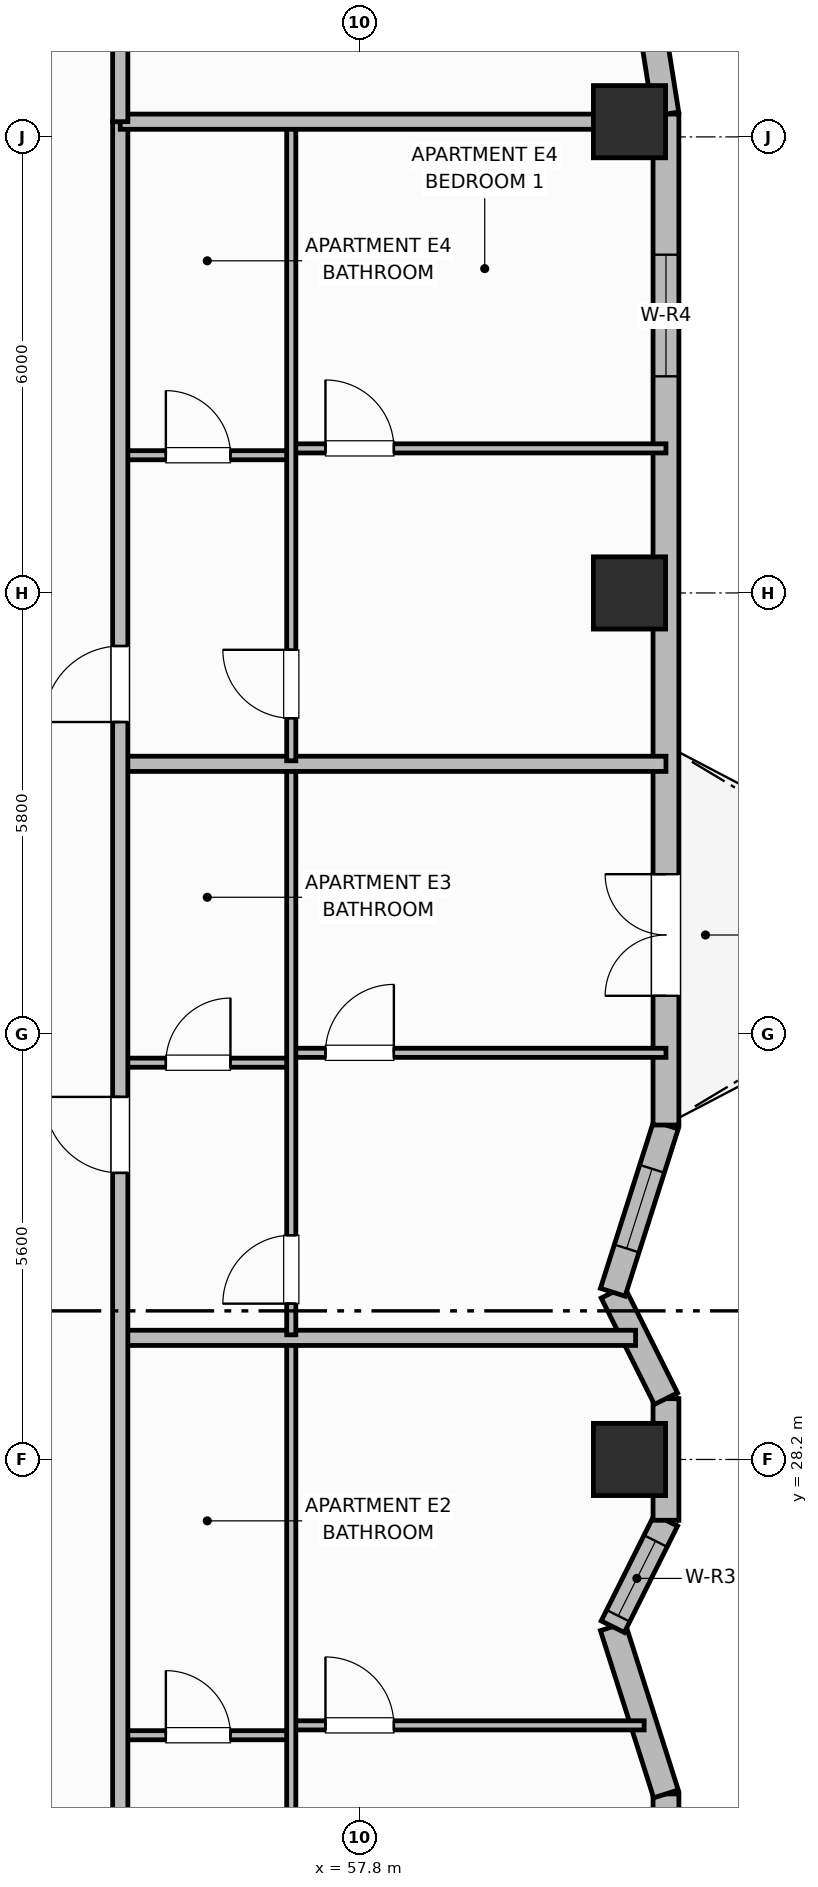
"""IFC4 building model, lengths in metres.
Left out: names, types, materials, properties, quantities, classifications, styles, units other than length and angle.
Written with IfcOpenShell. Run it as: python <this file> out.ifc"""

import sys

from ifc_helpers import new_model, si_unit, direction, frame, frame_2d, origin, origin_2d, place, context, subcontext, project, spatial, rectangle, extrude, element, fill, save


model = new_model("IFC4")
c1 = context("Model", 3, precision=1e-05, world=origin(), true_north=direction((0.0, 1.0)))
c2 = subcontext(c1, "Body", "Model", "MODEL_VIEW")
j1 = project(units=[si_unit("LENGTHUNIT", "METRE"), si_unit("PLANEANGLEUNIT", "RADIAN")], contexts=[c1])
p1 = place(None, origin())
s1 = spatial("IfcSite", under=j1, at=p1, CompositionType="ELEMENT")
p2 = place(p1, origin())
s2 = spatial("IfcBuilding", under=s1, at=p2, CompositionType="ELEMENT")
p3 = place(p2, frame((0.0, 0.0, 177.4)))
s3 = spatial("IfcBuildingStorey", under=s2, at=p3, CompositionType="ELEMENT", Elevation=177.4)
for number, where, z_axis, x_axis in (
    (1, (61.35, 28.2, 0.0), (0.0, 0.0, 1.0), (1.0, 0.0, 0.0)),
    (2, (61.35, 39.6, 0.0), (0.0, 0.0, 1.0), (1.0, 0.0, 0.0)),
    (3, (61.35, 45.8, 0.0), (0.0, 0.0, 1.0), (1.0, 0.0, 0.0)),
):
    element("IfcColumn", number, at=place(p3, frame(where, z_axis=z_axis, x_axis=x_axis)), inside=s3, PredefinedType="COLUMN", context=c2, shape_type="SweptSolid", body=[
        extrude(rectangle(XDim=0.95, YDim=0.95, at=origin_2d()), origin(), (0.0, 0.0, 1.0), 3.7),
    ])
p4 = place(p3, frame((61.83, 10.5, 0.0), z_axis=(0.0, 0.0, 1.0), x_axis=(0.0, 1.0, 0.0)))
e4 = element("IfcWall", 4, at=p4, inside=s3, PredefinedType="SOLIDWALL", context=c2, shape_type="SweptSolid", body=[
    extrude(rectangle(XDim=13.3, YDim=0.34, at=frame_2d((6.65, 0.0))), origin(), (0.0, 0.0, 1.0), 2.72),
])
p5 = place(p4, frame((1.75, 0.0, 0.75)))
e5 = element("IfcOpeningElement", 5, at=p5, cuts=e4, PredefinedType="OPENING", context=c2, shape_type="SweptSolid", body=[
    extrude(rectangle(XDim=1.8, YDim=1.85, at=frame_2d((0.9, 0.925))), frame((0.0, 0.18, 0.0), z_axis=(0.0, -1.0, 0.0), x_axis=(1.0, 0.0, 0.0)), (0.0, 0.0, 1.0), 0.36),
])
p6 = place(p4, frame((6.84, 0.0, 0.71)))
e6 = element("IfcOpeningElement", 6, at=p6, cuts=e4, PredefinedType="OPENING", context=c2, shape_type="SweptSolid", body=[
    extrude(rectangle(XDim=1.4, YDim=1.85, at=frame_2d((0.7, 0.925))), frame((0.0, 0.18, 0.0), z_axis=(0.0, -1.0, 0.0), x_axis=(1.0, 0.0, 0.0)), (0.0, 0.0, 1.0), 0.36),
])
p7 = place(p4, frame((9.75, 0.0, 0.75)))
e7 = element("IfcOpeningElement", 7, at=p7, cuts=e4, PredefinedType="OPENING", context=c2, shape_type="SweptSolid", body=[
    extrude(rectangle(XDim=1.8, YDim=1.85, at=frame_2d((0.9, 0.925))), frame((0.0, 0.18, 0.0), z_axis=(0.0, -1.0, 0.0), x_axis=(1.0, 0.0, 0.0)), (0.0, 0.0, 1.0), 0.36),
])
p8 = place(p3, frame((61.83, 23.8, 0.0), z_axis=(0.0, 0.0, 1.0), x_axis=(-0.303286588318, 0.95289938889, 0.0)))
e8 = element("IfcWall", 8, at=p8, inside=s3, PredefinedType="SOLIDWALL", context=c2, shape_type="SweptSolid", body=[
    extrude(rectangle(XDim=2.309, YDim=0.34, at=frame_2d((1.154, 0.0))), origin(), (0.0, 0.0, 1.0), 2.72),
])
p9 = place(p3, frame((61.13, 26.0, 0.0), z_axis=(0.0, 0.0, 1.0), x_axis=(0.447338371726, 0.894364792007, 0.0)))
e9 = element("IfcWall", 9, at=p9, inside=s3, PredefinedType="SOLIDWALL", context=c2, shape_type="SweptSolid", body=[
    extrude(rectangle(XDim=1.565, YDim=0.34, at=frame_2d((0.783, 0.0))), origin(), (0.0, 0.0, 1.0), 2.72),
])
p10 = place(p9, frame((0.16, 0.0, 0.91)))
e10 = element("IfcOpeningElement", 10, at=p10, cuts=e9, PredefinedType="OPENING", context=c2, shape_type="SweptSolid", body=[
    extrude(rectangle(XDim=1.1, YDim=1.65, at=frame_2d((0.55, 0.825))), frame((0.0, 0.18, 0.0), z_axis=(0.0, -1.0, 0.0), x_axis=(1.0, 0.0, 0.0)), (0.0, 0.0, 1.0), 0.36),
])
p11 = place(p3, frame((61.83, 27.4, 0.0), z_axis=(0.0, 0.0, 1.0), x_axis=(0.0, 1.0, 0.0)))
e11 = element("IfcWall", 11, at=p11, inside=s3, PredefinedType="SOLIDWALL", context=c2, shape_type="SweptSolid", body=[
    extrude(rectangle(XDim=1.6, YDim=0.34, at=frame_2d((0.8, 0.0))), origin(), (0.0, 0.0, 1.0), 2.72),
])
p12 = place(p3, frame((61.83, 29.0, 0.0), z_axis=(0.0, 0.0, 1.0), x_axis=(-0.447338371726, 0.894364792007, 0.0)))
e12 = element("IfcWall", 12, at=p12, inside=s3, PredefinedType="SOLIDWALL", context=c2, shape_type="SweptSolid", body=[
    extrude(rectangle(XDim=1.565, YDim=0.34, at=frame_2d((0.783, 0.0))), origin(), (0.0, 0.0, 1.0), 2.72),
])
p13 = place(p3, frame((61.13, 30.4, 0.0), z_axis=(0.0, 0.0, 1.0), x_axis=(0.303256029766, 0.952909114454, 0.0)))
e13 = element("IfcWall", 13, at=p13, inside=s3, PredefinedType="SOLIDWALL", context=c2, shape_type="SweptSolid", body=[
    extrude(rectangle(XDim=2.309, YDim=0.34, at=frame_2d((1.154, 0.0))), origin(), (0.0, 0.0, 1.0), 2.72),
])
p14 = place(p13, frame((0.604, 0.0, 0.91)))
e14 = element("IfcOpeningElement", 14, at=p14, cuts=e13, PredefinedType="OPENING", context=c2, shape_type="SweptSolid", body=[
    extrude(rectangle(XDim=1.1, YDim=1.65, at=frame_2d((0.55, 0.825))), frame((0.0, 0.18, 0.0), z_axis=(0.0, -1.0, 0.0), x_axis=(1.0, 0.0, 0.0)), (0.0, 0.0, 1.0), 0.36),
])
p15 = place(p3, frame((61.83, 32.6, 0.0), z_axis=(0.0, 0.0, 1.0), x_axis=(0.0, 1.0, 0.0)))
e15 = element("IfcWall", 15, at=p15, inside=s3, PredefinedType="SOLIDWALL", context=c2, shape_type="SweptSolid", body=[
    extrude(rectangle(XDim=13.3, YDim=0.34, at=frame_2d((6.65, 0.0))), origin(), (0.0, 0.0, 1.0), 2.72),
])
p16 = place(p15, frame((1.7, 0.0, 0.0)))
e16 = element("IfcOpeningElement", 16, at=p16, cuts=e15, PredefinedType="OPENING", context=c2, shape_type="SweptSolid", body=[
    extrude(rectangle(XDim=1.6, YDim=2.1, at=frame_2d((0.8, 1.05))), frame((0.0, 0.18, 0.0), z_axis=(0.0, -1.0, 0.0), x_axis=(1.0, 0.0, 0.0)), (0.0, 0.0, 1.0), 0.36),
])
p17 = place(p15, frame((9.85, 0.0, 0.7)))
e17 = element("IfcOpeningElement", 17, at=p17, cuts=e15, PredefinedType="OPENING", context=c2, shape_type="SweptSolid", body=[
    extrude(rectangle(XDim=1.6, YDim=1.9, at=frame_2d((0.8, 0.95))), frame((0.0, 0.18, 0.0), z_axis=(0.0, -1.0, 0.0), x_axis=(1.0, 0.0, 0.0)), (0.0, 0.0, 1.0), 0.36),
])
p18 = place(p3, frame((61.83, 45.9, 0.0), z_axis=(0.0, 0.0, 1.0), x_axis=(-0.156481329164, 0.987680916907, 0.0)))
e18 = element("IfcWall", 18, at=p18, inside=s3, PredefinedType="SOLIDWALL", context=c2, shape_type="SweptSolid", body=[
    extrude(rectangle(XDim=1.136, YDim=0.34, at=frame_2d((0.568, 0.0))), origin(), (0.0, 0.0, 1.0), 2.72),
])
p19 = place(p3, frame((54.65, 24.572, 0.0), z_axis=(0.0, 0.0, 1.0), x_axis=(1.0, 0.0, 0.0)))
e19 = element("IfcWall", 19, at=p19, inside=s3, PredefinedType="PARTITIONING", context=c2, shape_type="SweptSolid", body=[
    extrude(rectangle(XDim=2.25, YDim=0.12, at=frame_2d((1.125, 0.0))), origin(), (0.0, 0.0, 1.0), 2.55),
])
p20 = place(p19, frame((0.6, 0.0, 0.0)))
e20 = element("IfcOpeningElement", 20, at=p20, cuts=e19, PredefinedType="OPENING", context=c2, shape_type="SweptSolid", body=[
    extrude(rectangle(XDim=0.85, YDim=2.1, at=frame_2d((0.425, 1.05))), frame((0.0, 0.07, 0.0), z_axis=(0.0, -1.0, 0.0), x_axis=(1.0, 0.0, 0.0)), (0.0, 0.0, 1.0), 0.14),
])
p21 = place(p3, frame((56.9, 24.702, 0.0), z_axis=(0.0, 0.0, 1.0), x_axis=(1.0, 0.0, 0.0)))
e21 = element("IfcWall", 21, at=p21, inside=s3, PredefinedType="PARTITIONING", context=c2, shape_type="SweptSolid", body=[
    extrude(rectangle(XDim=4.643, YDim=0.12, at=frame_2d((2.322, 0.0))), origin(), (0.0, 0.0, 1.0), 2.55),
])
p22 = place(p21, frame((0.45, 0.0, 0.0)))
e22 = element("IfcOpeningElement", 22, at=p22, cuts=e21, PredefinedType="OPENING", context=c2, shape_type="SweptSolid", body=[
    extrude(rectangle(XDim=0.9, YDim=2.1, at=frame_2d((0.45, 1.05))), frame((0.0, 0.07, 0.0), z_axis=(0.0, -1.0, 0.0), x_axis=(1.0, 0.0, 0.0)), (0.0, 0.0, 1.0), 0.14),
])
p23 = place(p3, frame((56.9, 19.792, 0.0), z_axis=(0.0, 0.0, 1.0), x_axis=(0.0, 1.0, 0.0)))
e23 = element("IfcWall", 23, at=p23, inside=s3, PredefinedType="PARTITIONING", context=c2, shape_type="SweptSolid", body=[
    extrude(rectangle(XDim=9.968, YDim=0.12, at=frame_2d((4.984, 0.0))), origin(), (0.0, 0.0, 1.0), 2.55),
])
p24 = place(p23, frame((0.41, 0.0, 0.0)))
e24 = element("IfcOpeningElement", 24, at=p24, cuts=e23, PredefinedType="OPENING", context=c2, shape_type="SweptSolid", body=[
    extrude(rectangle(XDim=0.9, YDim=2.1, at=frame_2d((0.45, 1.05))), frame((0.0, 0.07, 0.0), z_axis=(0.0, -1.0, 0.0), x_axis=(1.0, 0.0, 0.0)), (0.0, 0.0, 1.0), 0.14),
])
p25 = place(p3, frame((54.65, 29.8, 0.0), z_axis=(0.0, 0.0, 1.0), x_axis=(1.0, 0.0, 0.0)))
e25 = element("IfcWall", 25, at=p25, inside=s3, PredefinedType="PARTITIONING", context=c2, shape_type="SweptSolid", body=[
    extrude(rectangle(XDim=6.78, YDim=0.2, at=frame_2d((3.39, 0.0))), origin(), (0.0, 0.0, 1.0), 2.55),
])
p26 = place(p3, frame((54.65, 33.42, 0.0), z_axis=(0.0, 0.0, 1.0), x_axis=(1.0, 0.0, 0.0)))
e26 = element("IfcWall", 26, at=p26, inside=s3, PredefinedType="PARTITIONING", context=c2, shape_type="SweptSolid", body=[
    extrude(rectangle(XDim=2.25, YDim=0.12, at=frame_2d((1.125, 0.0))), origin(), (0.0, 0.0, 1.0), 2.55),
])
p27 = place(p26, frame((0.6, 0.0, 0.0)))
e27 = element("IfcOpeningElement", 27, at=p27, cuts=e26, PredefinedType="OPENING", context=c2, shape_type="SweptSolid", body=[
    extrude(rectangle(XDim=0.85, YDim=2.1, at=frame_2d((0.425, 1.05))), frame((0.0, 0.07, 0.0), z_axis=(0.0, -1.0, 0.0), x_axis=(1.0, 0.0, 0.0)), (0.0, 0.0, 1.0), 0.14),
])
p28 = place(p3, frame((56.9, 33.55, 0.0), z_axis=(0.0, 0.0, 1.0), x_axis=(1.0, 0.0, 0.0)))
e28 = element("IfcWall", 28, at=p28, inside=s3, PredefinedType="PARTITIONING", context=c2, shape_type="SweptSolid", body=[
    extrude(rectangle(XDim=4.93, YDim=0.12, at=frame_2d((2.465, 0.0))), origin(), (0.0, 0.0, 1.0), 2.55),
])
p29 = place(p28, frame((0.45, 0.0, 0.0)))
e29 = element("IfcOpeningElement", 29, at=p29, cuts=e28, PredefinedType="OPENING", context=c2, shape_type="SweptSolid", body=[
    extrude(rectangle(XDim=0.9, YDim=2.1, at=frame_2d((0.45, 1.05))), frame((0.0, 0.07, 0.0), z_axis=(0.0, -1.0, 0.0), x_axis=(1.0, 0.0, 0.0)), (0.0, 0.0, 1.0), 0.14),
])
p30 = place(p3, frame((56.9, 29.84, 0.0), z_axis=(0.0, 0.0, 1.0), x_axis=(0.0, 1.0, 0.0)))
e30 = element("IfcWall", 30, at=p30, inside=s3, PredefinedType="PARTITIONING", context=c2, shape_type="SweptSolid", body=[
    extrude(rectangle(XDim=7.472, YDim=0.12, at=frame_2d((3.736, 0.0))), origin(), (0.0, 0.0, 1.0), 2.55),
])
p31 = place(p30, frame((0.41, 0.0, 0.0)))
e31 = element("IfcOpeningElement", 31, at=p31, cuts=e30, PredefinedType="OPENING", context=c2, shape_type="SweptSolid", body=[
    extrude(rectangle(XDim=0.9, YDim=2.1, at=frame_2d((0.45, 1.05))), frame((0.0, 0.07, 0.0), z_axis=(0.0, -1.0, 0.0), x_axis=(1.0, 0.0, 0.0)), (0.0, 0.0, 1.0), 0.14),
])
p32 = place(p3, frame((54.65, 37.352, 0.0), z_axis=(0.0, 0.0, 1.0), x_axis=(1.0, 0.0, 0.0)))
e32 = element("IfcWall", 32, at=p32, inside=s3, PredefinedType="PARTITIONING", context=c2, shape_type="SweptSolid", body=[
    extrude(rectangle(XDim=7.18, YDim=0.2, at=frame_2d((3.59, 0.0))), origin(), (0.0, 0.0, 1.0), 2.55),
])
p33 = place(p3, frame((54.65, 41.412, 0.0), z_axis=(0.0, 0.0, 1.0), x_axis=(1.0, 0.0, 0.0)))
e33 = element("IfcWall", 33, at=p33, inside=s3, PredefinedType="PARTITIONING", context=c2, shape_type="SweptSolid", body=[
    extrude(rectangle(XDim=2.25, YDim=0.12, at=frame_2d((1.125, 0.0))), origin(), (0.0, 0.0, 1.0), 2.55),
])
p34 = place(p33, frame((0.6, 0.0, 0.0)))
e34 = element("IfcOpeningElement", 34, at=p34, cuts=e33, PredefinedType="OPENING", context=c2, shape_type="SweptSolid", body=[
    extrude(rectangle(XDim=0.85, YDim=2.1, at=frame_2d((0.425, 1.05))), frame((0.0, 0.07, 0.0), z_axis=(0.0, -1.0, 0.0), x_axis=(1.0, 0.0, 0.0)), (0.0, 0.0, 1.0), 0.14),
])
p35 = place(p3, frame((56.9, 41.502, 0.0), z_axis=(0.0, 0.0, 1.0), x_axis=(1.0, 0.0, 0.0)))
e35 = element("IfcWall", 35, at=p35, inside=s3, PredefinedType="PARTITIONING", context=c2, shape_type="SweptSolid", body=[
    extrude(rectangle(XDim=4.93, YDim=0.12, at=frame_2d((2.465, 0.0))), origin(), (0.0, 0.0, 1.0), 2.55),
])
p36 = place(p35, frame((0.45, 0.0, 0.0)))
e36 = element("IfcOpeningElement", 36, at=p36, cuts=e35, PredefinedType="OPENING", context=c2, shape_type="SweptSolid", body=[
    extrude(rectangle(XDim=0.9, YDim=2.1, at=frame_2d((0.45, 1.05))), frame((0.0, 0.07, 0.0), z_axis=(0.0, -1.0, 0.0), x_axis=(1.0, 0.0, 0.0)), (0.0, 0.0, 1.0), 0.14),
])
p37 = place(p3, frame((56.9, 37.392, 0.0), z_axis=(0.0, 0.0, 1.0), x_axis=(0.0, 1.0, 0.0)))
e37 = element("IfcWall", 37, at=p37, inside=s3, PredefinedType="PARTITIONING", context=c2, shape_type="SweptSolid", body=[
    extrude(rectangle(XDim=8.368, YDim=0.12, at=frame_2d((4.184, 0.0))), origin(), (0.0, 0.0, 1.0), 2.55),
])
p38 = place(p37, frame((0.56, 0.0, 0.0)))
e38 = element("IfcOpeningElement", 38, at=p38, cuts=e37, PredefinedType="OPENING", context=c2, shape_type="SweptSolid", body=[
    extrude(rectangle(XDim=0.9, YDim=2.1, at=frame_2d((0.45, 1.05))), frame((0.0, 0.07, 0.0), z_axis=(0.0, -1.0, 0.0), x_axis=(1.0, 0.0, 0.0)), (0.0, 0.0, 1.0), 0.14),
])
p39 = place(p3, frame((54.65, 10.6, 0.0), z_axis=(0.0, 0.0, 1.0), x_axis=(0.0, 1.0, 0.0)))
e39 = element("IfcWall", 39, at=p39, inside=s3, PredefinedType="PARTITIONING", context=c2, shape_type="SweptSolid", body=[
    extrude(rectangle(XDim=35.2, YDim=0.2, at=frame_2d((17.6, 0.0))), origin(), (0.0, 0.0, 1.0), 2.55),
])
p40 = place(p39, frame((2.65, 0.0, 0.0)))
e40 = element("IfcOpeningElement", 40, at=p40, cuts=e39, PredefinedType="OPENING", context=c2, shape_type="SweptSolid", body=[
    extrude(rectangle(XDim=1.0, YDim=2.15, at=frame_2d((0.5, 1.075))), frame((0.0, 0.11, 0.0), z_axis=(0.0, -1.0, 0.0), x_axis=(1.0, 0.0, 0.0)), (0.0, 0.0, 1.0), 0.22),
])
p41 = place(p39, frame((11.352, 0.0, 0.0)))
e41 = element("IfcOpeningElement", 41, at=p41, cuts=e39, PredefinedType="OPENING", context=c2, shape_type="SweptSolid", body=[
    extrude(rectangle(XDim=1.0, YDim=2.15, at=frame_2d((0.5, 1.075))), frame((0.0, 0.11, 0.0), z_axis=(0.0, -1.0, 0.0), x_axis=(1.0, 0.0, 0.0)), (0.0, 0.0, 1.0), 0.22),
])
p42 = place(p39, frame((21.37, 0.0, 0.0)))
e42 = element("IfcOpeningElement", 42, at=p42, cuts=e39, PredefinedType="OPENING", context=c2, shape_type="SweptSolid", body=[
    extrude(rectangle(XDim=1.0, YDim=2.15, at=frame_2d((0.5, 1.075))), frame((0.0, 0.11, 0.0), z_axis=(0.0, -1.0, 0.0), x_axis=(1.0, 0.0, 0.0)), (0.0, 0.0, 1.0), 0.22),
])
p43 = place(p39, frame((27.302, 0.0, 0.0)))
e43 = element("IfcOpeningElement", 43, at=p43, cuts=e39, PredefinedType="OPENING", context=c2, shape_type="SweptSolid", body=[
    extrude(rectangle(XDim=1.0, YDim=2.15, at=frame_2d((0.5, 1.075))), frame((0.0, 0.11, 0.0), z_axis=(0.0, -1.0, 0.0), x_axis=(1.0, 0.0, 0.0)), (0.0, 0.0, 1.0), 0.22),
])
p44 = place(p3, frame((54.65, 45.8, 0.0), z_axis=(0.0, 0.0, 1.0), x_axis=(1.0, 0.0, 0.0)))
e44 = element("IfcWall", 44, at=p44, inside=s3, PredefinedType="PARTITIONING", context=c2, shape_type="SweptSolid", body=[
    extrude(rectangle(XDim=6.76, YDim=0.2, at=frame_2d((3.38, 0.0))), origin(), (0.0, 0.0, 1.0), 2.55),
])
p45 = place(p3, frame((54.65, 45.8, 0.0), z_axis=(0.0, 0.0, 1.0), x_axis=(0.0, 1.0, 0.0)))
e45 = element("IfcWall", 45, at=p45, inside=s3, PredefinedType="PARTITIONING", context=c2, shape_type="SweptSolid", body=[
    extrude(rectangle(XDim=3.73, YDim=0.2, at=frame_2d((1.865, 0.0))), origin(), (0.0, 0.0, 1.0), 2.55),
])
p46 = place(p10, origin())
e46 = element("IfcWindow", 46, at=p46, inside=s3, PartitioningType="SINGLE_PANEL", PredefinedType="WINDOW", context=c2, shape_type="SweptSolid", body=[
    extrude(rectangle(XDim=1.1, YDim=1.65, at=frame_2d((0.55, 0.825))), frame((0.0, 0.03, 0.0), z_axis=(0.0, -1.0, 0.0), x_axis=(1.0, 0.0, 0.0)), (0.0, 0.0, 1.0), 0.06),
])
fill(e10, e46)
p47 = place(p14, origin())
e47 = element("IfcWindow", 47, at=p47, inside=s3, PartitioningType="SINGLE_PANEL", PredefinedType="WINDOW", context=c2, shape_type="SweptSolid", body=[
    extrude(rectangle(XDim=1.1, YDim=1.65, at=frame_2d((0.55, 0.825))), frame((0.0, 0.03, 0.0), z_axis=(0.0, -1.0, 0.0), x_axis=(1.0, 0.0, 0.0)), (0.0, 0.0, 1.0), 0.06),
])
fill(e14, e47)
p48 = place(p16, origin())
e48 = element("IfcDoor", 48, at=p48, inside=s3, OperationType="DOUBLE_DOOR_SINGLE_SWING", PredefinedType="DOOR", context=c2, shape_type="SweptSolid", body=[
    extrude(rectangle(XDim=1.6, YDim=2.1, at=frame_2d((0.8, 1.05))), frame((0.0, 0.025, 0.0), z_axis=(0.0, -1.0, 0.0), x_axis=(1.0, 0.0, 0.0)), (0.0, 0.0, 1.0), 0.05),
])
fill(e16, e48)
p49 = place(p17, origin())
e49 = element("IfcWindow", 49, at=p49, inside=s3, PartitioningType="SINGLE_PANEL", PredefinedType="WINDOW", context=c2, shape_type="SweptSolid", body=[
    extrude(rectangle(XDim=1.6, YDim=1.9, at=frame_2d((0.8, 0.95))), frame((0.0, 0.03, 0.0), z_axis=(0.0, -1.0, 0.0), x_axis=(1.0, 0.0, 0.0)), (0.0, 0.0, 1.0), 0.06),
])
fill(e17, e49)
p50 = place(p20, origin())
e50 = element("IfcDoor", 50, at=p50, inside=s3, OperationType="SINGLE_SWING_LEFT", PredefinedType="DOOR", context=c2, shape_type="SweptSolid", body=[
    extrude(rectangle(XDim=0.85, YDim=2.1, at=frame_2d((0.425, 1.05))), frame((0.0, 0.025, 0.0), z_axis=(0.0, -1.0, 0.0), x_axis=(1.0, 0.0, 0.0)), (0.0, 0.0, 1.0), 0.05),
])
fill(e20, e50)
p51 = place(p22, origin())
e51 = element("IfcDoor", 51, at=p51, inside=s3, OperationType="SINGLE_SWING_LEFT", PredefinedType="DOOR", context=c2, shape_type="SweptSolid", body=[
    extrude(rectangle(XDim=0.9, YDim=2.1, at=frame_2d((0.45, 1.05))), frame((0.0, 0.025, 0.0), z_axis=(0.0, -1.0, 0.0), x_axis=(1.0, 0.0, 0.0)), (0.0, 0.0, 1.0), 0.05),
])
fill(e22, e51)
p52 = place(p27, origin())
e52 = element("IfcDoor", 52, at=p52, inside=s3, OperationType="SINGLE_SWING_RIGHT", PredefinedType="DOOR", context=c2, shape_type="SweptSolid", body=[
    extrude(rectangle(XDim=0.85, YDim=2.1, at=frame_2d((0.425, 1.05))), frame((0.0, 0.025, 0.0), z_axis=(0.0, -1.0, 0.0), x_axis=(1.0, 0.0, 0.0)), (0.0, 0.0, 1.0), 0.05),
])
fill(e27, e52)
p53 = place(p29, origin())
e53 = element("IfcDoor", 53, at=p53, inside=s3, OperationType="SINGLE_SWING_RIGHT", PredefinedType="DOOR", context=c2, shape_type="SweptSolid", body=[
    extrude(rectangle(XDim=0.9, YDim=2.1, at=frame_2d((0.45, 1.05))), frame((0.0, 0.025, 0.0), z_axis=(0.0, -1.0, 0.0), x_axis=(1.0, 0.0, 0.0)), (0.0, 0.0, 1.0), 0.05),
])
fill(e29, e53)
p54 = place(p31, origin())
e54 = element("IfcDoor", 54, at=p54, inside=s3, OperationType="SINGLE_SWING_LEFT", PredefinedType="DOOR", context=c2, shape_type="SweptSolid", body=[
    extrude(rectangle(XDim=0.9, YDim=2.1, at=frame_2d((0.45, 1.05))), frame((0.0, 0.025, 0.0), z_axis=(0.0, -1.0, 0.0), x_axis=(1.0, 0.0, 0.0)), (0.0, 0.0, 1.0), 0.05),
])
fill(e31, e54)
p55 = place(p34, origin())
e55 = element("IfcDoor", 55, at=p55, inside=s3, OperationType="SINGLE_SWING_LEFT", PredefinedType="DOOR", context=c2, shape_type="SweptSolid", body=[
    extrude(rectangle(XDim=0.85, YDim=2.1, at=frame_2d((0.425, 1.05))), frame((0.0, 0.025, 0.0), z_axis=(0.0, -1.0, 0.0), x_axis=(1.0, 0.0, 0.0)), (0.0, 0.0, 1.0), 0.05),
])
fill(e34, e55)
p56 = place(p36, origin())
e56 = element("IfcDoor", 56, at=p56, inside=s3, OperationType="SINGLE_SWING_LEFT", PredefinedType="DOOR", context=c2, shape_type="SweptSolid", body=[
    extrude(rectangle(XDim=0.9, YDim=2.1, at=frame_2d((0.45, 1.05))), frame((0.0, 0.025, 0.0), z_axis=(0.0, -1.0, 0.0), x_axis=(1.0, 0.0, 0.0)), (0.0, 0.0, 1.0), 0.05),
])
fill(e36, e56)
p57 = place(p38, origin())
e57 = element("IfcDoor", 57, at=p57, inside=s3, OperationType="SINGLE_SWING_RIGHT", PredefinedType="DOOR", context=c2, shape_type="SweptSolid", body=[
    extrude(rectangle(XDim=0.9, YDim=2.1, at=frame_2d((0.45, 1.05))), frame((0.0, 0.025, 0.0), z_axis=(0.0, -1.0, 0.0), x_axis=(1.0, 0.0, 0.0)), (0.0, 0.0, 1.0), 0.05),
])
fill(e38, e57)
p58 = place(p42, origin())
e58 = element("IfcDoor", 58, at=p58, inside=s3, OperationType="SINGLE_SWING_RIGHT", PredefinedType="DOOR", context=c2, shape_type="SweptSolid", body=[
    extrude(rectangle(XDim=1.0, YDim=2.15, at=frame_2d((0.5, 1.075))), frame((0.0, 0.025, 0.0), z_axis=(0.0, -1.0, 0.0), x_axis=(1.0, 0.0, 0.0)), (0.0, 0.0, 1.0), 0.05),
])
fill(e42, e58)
p59 = place(p43, origin())
e59 = element("IfcDoor", 59, at=p59, inside=s3, OperationType="SINGLE_SWING_LEFT", PredefinedType="DOOR", context=c2, shape_type="SweptSolid", body=[
    extrude(rectangle(XDim=1.0, YDim=2.15, at=frame_2d((0.5, 1.075))), frame((0.0, 0.025, 0.0), z_axis=(0.0, -1.0, 0.0), x_axis=(1.0, 0.0, 0.0)), (0.0, 0.0, 1.0), 0.05),
])
fill(e43, e59)
save(model, sys.argv[1])
